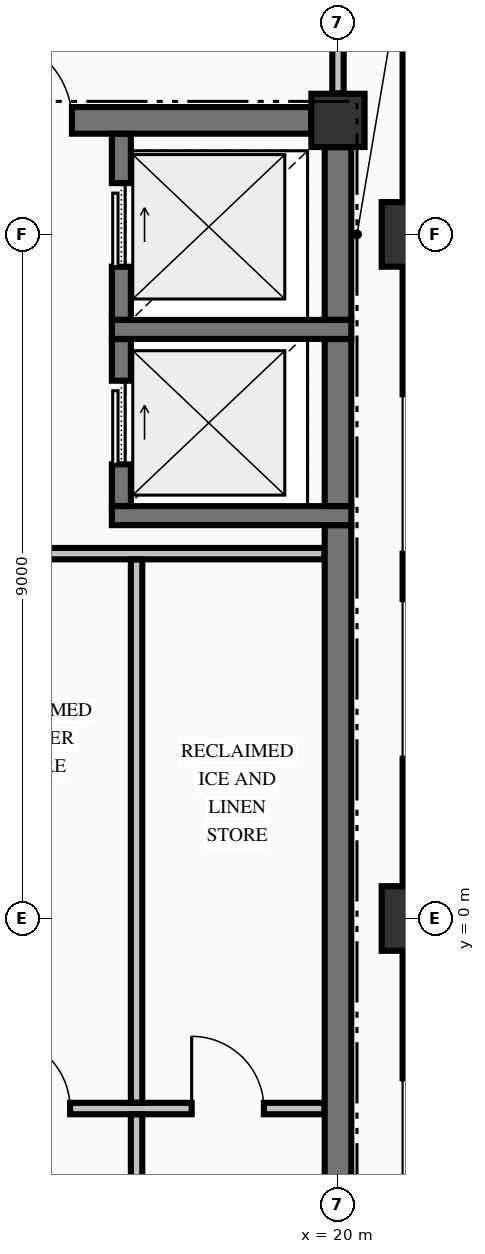
"""IFC4 building model, lengths in metres.
Left out: names, types, materials, properties, quantities, classifications, styles, units other than length and angle.
Written with IfcOpenShell. Run it as: python <this file> out.ifc"""

import sys

from ifc_helpers import new_model, si_unit, direction, frame, frame_2d, origin, origin_2d, place, context, subcontext, project, spatial, rectangle, extrude, element, fill, save


model = new_model("IFC4")
c1 = context("Model", 3, precision=1e-05, world=origin(), true_north=direction((0.0, 1.0)))
c2 = subcontext(c1, "Body", "Model", "MODEL_VIEW")
j1 = project(units=[si_unit("LENGTHUNIT", "METRE"), si_unit("PLANEANGLEUNIT", "RADIAN")], contexts=[c1])
p1 = place(None, origin())
s1 = spatial("IfcSite", under=j1, at=p1, CompositionType="ELEMENT")
p2 = place(p1, origin())
s2 = spatial("IfcBuilding", under=s1, at=p2, CompositionType="ELEMENT")
p3 = place(p2, frame((0.0, 0.0, 270.58)))
s3 = spatial("IfcBuildingStorey", under=s2, at=p3, CompositionType="ELEMENT", Elevation=270.58)
for number, where, z_axis, x_axis in (
    (1, (21.0, 0.0, -0.325), (0.0, 0.0, 1.0), (1.0, 0.0, 0.0)),
    (2, (21.0, 9.0, -0.325), (0.0, 0.0, 1.0), (1.0, 0.0, 0.0)),
):
    element("IfcColumn", number, at=place(p3, frame(where, z_axis=z_axis, x_axis=x_axis)), inside=s3, PredefinedType="COLUMN", context=c2, shape_type="SweptSolid", body=[
        extrude(rectangle(XDim=0.85, YDim=0.85, at=origin_2d()), origin(), (0.0, 0.0, 1.0), 3.815),
    ])
p4 = place(p3, frame((20.0, 10.5, -0.325), z_axis=(0.0, 0.0, 1.0), x_axis=(1.0, 0.0, 0.0)))
e3 = element("IfcColumn", 3, at=p4, inside=s3, PredefinedType="COLUMN", context=c2, shape_type="SweptSolid", body=[
    extrude(rectangle(XDim=0.7, YDim=0.7, at=origin_2d()), origin(), (0.0, 0.0, 1.0), 3.815),
])
p5 = place(p3, frame((21.0, -8.545, 0.0), z_axis=(0.0, 0.0, 1.0), x_axis=(0.0, 1.0, 0.0)))
e4 = element("IfcWall", 4, at=p5, inside=s3, PredefinedType="STANDARD", context=c2, shape_type="SweptSolid", body=[
    extrude(rectangle(XDim=8.09, YDim=0.3, at=frame_2d((4.045, 0.0))), origin(), (0.0, 0.0, 1.0), 2.882),
])
p6 = place(p5, frame((1.647, 0.0, 0.7)))
e5 = element("IfcOpeningElement", 5, at=p6, cuts=e4, PredefinedType="OPENING", context=c2, shape_type="SweptSolid", body=[
    extrude(rectangle(XDim=2.1, YDim=1.5, at=frame_2d((1.05, 0.75))), frame((0.0, 0.16, 0.0), z_axis=(0.0, -1.0, 0.0), x_axis=(1.0, 0.0, 0.0)), (0.0, 0.0, 1.0), 0.32),
])
p7 = place(p5, frame((4.343, 0.0, 0.7)))
e6 = element("IfcOpeningElement", 6, at=p7, cuts=e4, PredefinedType="OPENING", context=c2, shape_type="SweptSolid", body=[
    extrude(rectangle(XDim=2.1, YDim=1.5, at=frame_2d((1.05, 0.75))), frame((0.0, 0.16, 0.0), z_axis=(0.0, -1.0, 0.0), x_axis=(1.0, 0.0, 0.0)), (0.0, 0.0, 1.0), 0.32),
])
p8 = place(p3, frame((21.0, 0.455, 0.0), z_axis=(0.0, 0.0, 1.0), x_axis=(0.0, 1.0, 0.0)))
e7 = element("IfcWall", 7, at=p8, inside=s3, PredefinedType="STANDARD", context=c2, shape_type="SweptSolid", body=[
    extrude(rectangle(XDim=8.09, YDim=0.3, at=frame_2d((4.045, 0.0))), origin(), (0.0, 0.0, 1.0), 2.882),
])
p9 = place(p8, frame((1.647, 0.0, 0.7)))
e8 = element("IfcOpeningElement", 8, at=p9, cuts=e7, PredefinedType="OPENING", context=c2, shape_type="SweptSolid", body=[
    extrude(rectangle(XDim=2.1, YDim=1.5, at=frame_2d((1.05, 0.75))), frame((0.0, 0.16, 0.0), z_axis=(0.0, -1.0, 0.0), x_axis=(1.0, 0.0, 0.0)), (0.0, 0.0, 1.0), 0.32),
])
p10 = place(p8, frame((4.343, 0.0, 0.7)))
e9 = element("IfcOpeningElement", 9, at=p10, cuts=e7, PredefinedType="OPENING", context=c2, shape_type="SweptSolid", body=[
    extrude(rectangle(XDim=2.1, YDim=1.5, at=frame_2d((1.05, 0.75))), frame((0.0, 0.16, 0.0), z_axis=(0.0, -1.0, 0.0), x_axis=(1.0, 0.0, 0.0)), (0.0, 0.0, 1.0), 0.32),
])
p11 = place(p3, frame((21.0, 9.455, 0.0), z_axis=(0.0, 0.0, 1.0), x_axis=(0.0, 1.0, 0.0)))
e10 = element("IfcWall", 10, at=p11, inside=s3, PredefinedType="STANDARD", context=c2, shape_type="SweptSolid", body=[
    extrude(rectangle(XDim=8.09, YDim=0.3, at=frame_2d((4.045, 0.0))), origin(), (0.0, 0.0, 1.0), 2.882),
])
for number, where, z_axis, x_axis in (
    (11, (17.025, 5.3, 0.0), (0.0, 0.0, 1.0), (1.0, 0.0, 0.0)),
    (12, (17.025, 7.75, 0.0), (0.0, 0.0, 1.0), (1.0, 0.0, 0.0)),
):
    element("IfcWall", number, at=place(p3, frame(where, z_axis=z_axis, x_axis=x_axis)), inside=s3, PredefinedType="SOLIDWALL", context=c2, shape_type="SweptSolid", body=[
        extrude(rectangle(XDim=3.15, YDim=0.25, at=frame_2d((1.575, 0.0))), origin(), (0.0, 0.0, 1.0), 3.49),
    ])
p12 = place(p3, frame((14.7, 10.5, 0.0), z_axis=(0.0, 0.0, 1.0), x_axis=(1.0, 0.0, 0.0)))
e13 = element("IfcWall", 13, at=p12, inside=s3, PredefinedType="SHEAR", context=c2, shape_type="SweptSolid", body=[
    extrude(rectangle(XDim=4.946, YDim=0.35, at=frame_2d((2.473, 0.0))), origin(), (0.0, 0.0, 1.0), 3.49),
])
p13 = place(p12, frame((0.7, 0.0, 0.0)))
e14 = element("IfcOpeningElement", 14, at=p13, cuts=e13, PredefinedType="OPENING", context=c2, shape_type="SweptSolid", body=[
    extrude(rectangle(XDim=1.1, YDim=2.15, at=frame_2d((0.55, 1.075))), frame((0.0, 0.185, 0.0), z_axis=(0.0, -1.0, 0.0), x_axis=(1.0, 0.0, 0.0)), (0.0, 0.0, 1.0), 0.37),
])
p14 = place(p3, frame((14.878, -2.5, 0.0), z_axis=(0.0, 0.0, 1.0), x_axis=(1.0, 0.0, 0.0)))
e15 = element("IfcWall", 15, at=p14, inside=s3, PredefinedType="PARTITIONING", context=c2, shape_type="SweptSolid", body=[
    extrude(rectangle(XDim=4.944, YDim=0.15, at=frame_2d((2.472, 0.0))), origin(), (0.0, 0.0, 1.0), 3.49),
])
p15 = place(p14, frame((0.647, 0.0, 0.0)))
e16 = element("IfcOpeningElement", 16, at=p15, cuts=e15, PredefinedType="OPENING", context=c2, shape_type="SweptSolid", body=[
    extrude(rectangle(XDim=0.95, YDim=2.15, at=frame_2d((0.475, 1.075))), frame((0.0, 0.085, 0.0), z_axis=(0.0, -1.0, 0.0), x_axis=(1.0, 0.0, 0.0)), (0.0, 0.0, 1.0), 0.17),
])
p16 = place(p14, frame((3.197, 0.0, 0.0)))
e17 = element("IfcOpeningElement", 17, at=p16, cuts=e15, PredefinedType="OPENING", context=c2, shape_type="SweptSolid", body=[
    extrude(rectangle(XDim=0.95, YDim=2.15, at=frame_2d((0.475, 1.075))), frame((0.0, 0.085, 0.0), z_axis=(0.0, -1.0, 0.0), x_axis=(1.0, 0.0, 0.0)), (0.0, 0.0, 1.0), 0.17),
])
p17 = place(p3, frame((14.878, 4.8, 0.0), z_axis=(0.0, 0.0, 1.0), x_axis=(1.0, 0.0, 0.0)))
e18 = element("IfcWall", 18, at=p17, inside=s3, PredefinedType="PARTITIONING", context=c2, shape_type="SweptSolid", body=[
    extrude(rectangle(XDim=4.944, YDim=0.15, at=frame_2d((2.472, 0.0))), origin(), (0.0, 0.0, 1.0), 3.49),
])
p18 = place(p3, frame((17.15, 5.427, 0.0), z_axis=(0.0, 0.0, 1.0), x_axis=(0.0, 1.0, 0.0)))
e19 = element("IfcWall", 19, at=p18, inside=s3, PredefinedType="SOLIDWALL", context=c2, shape_type="SweptSolid", body=[
    extrude(rectangle(XDim=2.196, YDim=0.25, at=frame_2d((1.098, 0.0))), origin(), (0.0, 0.0, 1.0), 3.49),
])
p19 = place(p18, frame((0.548, 0.0, 0.0)))
e20 = element("IfcOpeningElement", 20, at=p19, cuts=e19, PredefinedType="OPENING", context=c2, shape_type="SweptSolid", body=[
    extrude(rectangle(XDim=1.1, YDim=2.2, at=frame_2d((0.55, 1.1))), frame((0.0, 0.135, 0.0), z_axis=(0.0, -1.0, 0.0), x_axis=(1.0, 0.0, 0.0)), (0.0, 0.0, 1.0), 0.27),
])
p20 = place(p3, frame((17.15, 7.877, 0.0), z_axis=(0.0, 0.0, 1.0), x_axis=(0.0, 1.0, 0.0)))
e21 = element("IfcWall", 21, at=p20, inside=s3, PredefinedType="SOLIDWALL", context=c2, shape_type="SweptSolid", body=[
    extrude(rectangle(XDim=2.446, YDim=0.25, at=frame_2d((1.223, 0.0))), origin(), (0.0, 0.0, 1.0), 3.49),
])
p21 = place(p20, frame((0.698, 0.0, 0.0)))
e22 = element("IfcOpeningElement", 22, at=p21, cuts=e21, PredefinedType="OPENING", context=c2, shape_type="SweptSolid", body=[
    extrude(rectangle(XDim=1.1, YDim=2.2, at=frame_2d((0.55, 1.1))), frame((0.0, 0.135, 0.0), z_axis=(0.0, -1.0, 0.0), x_axis=(1.0, 0.0, 0.0)), (0.0, 0.0, 1.0), 0.27),
])
p22 = place(p3, frame((20.0, -9.596, 0.0), z_axis=(0.0, 0.0, 1.0), x_axis=(0.0, 1.0, 0.0)))
e23 = element("IfcWall", 23, at=p22, inside=s3, PredefinedType="SHEAR", context=c2, shape_type="SweptSolid", body=[
    extrude(rectangle(XDim=14.769, YDim=0.35, at=frame_2d((7.385, 0.0))), origin(), (0.0, 0.0, 1.0), 3.49),
])
p23 = place(p3, frame((20.0, 5.427, 0.0), z_axis=(0.0, 0.0, 1.0), x_axis=(0.0, 1.0, 0.0)))
e24 = element("IfcWall", 24, at=p23, inside=s3, PredefinedType="SHEAR", context=c2, shape_type="SweptSolid", body=[
    extrude(rectangle(XDim=2.196, YDim=0.35, at=frame_2d((1.098, 0.0))), origin(), (0.0, 0.0, 1.0), 3.49),
])
p24 = place(p3, frame((20.0, 7.877, 0.0), z_axis=(0.0, 0.0, 1.0), x_axis=(0.0, 1.0, 0.0)))
e25 = element("IfcWall", 25, at=p24, inside=s3, PredefinedType="SHEAR", context=c2, shape_type="SweptSolid", body=[
    extrude(rectangle(XDim=2.269, YDim=0.35, at=frame_2d((1.135, 0.0))), origin(), (0.0, 0.0, 1.0), 3.49),
])
p25 = place(p3, frame((17.35, -9.772, 0.0), z_axis=(0.0, 0.0, 1.0), x_axis=(0.0, 1.0, 0.0)))
e26 = element("IfcWall", 26, at=p25, inside=s3, PredefinedType="PARTITIONING", context=c2, shape_type="SweptSolid", body=[
    extrude(rectangle(XDim=7.194, YDim=0.15, at=frame_2d((3.597, 0.0))), origin(), (0.0, 0.0, 1.0), 3.49),
])
p26 = place(p3, frame((17.35, -2.422, 0.0), z_axis=(0.0, 0.0, 1.0), x_axis=(0.0, 1.0, 0.0)))
e27 = element("IfcWall", 27, at=p26, inside=s3, PredefinedType="PARTITIONING", context=c2, shape_type="SweptSolid", body=[
    extrude(rectangle(XDim=7.144, YDim=0.15, at=frame_2d((3.572, 0.0))), origin(), (0.0, 0.0, 1.0), 3.49),
])
p27 = place(p3, frame((20.0, 10.856, 0.0), z_axis=(0.0, 0.0, 1.0), x_axis=(0.0, 1.0, 0.0)))
e28 = element("IfcWall", 28, at=p27, inside=s3, PredefinedType="PARTITIONING", context=c2, shape_type="SweptSolid", body=[
    extrude(rectangle(XDim=2.216, YDim=0.15, at=frame_2d((1.108, 0.0))), origin(), (0.0, 0.0, 1.0), 3.08),
])
p28 = place(p19, origin())
e29 = element("IfcDoor", 29, at=p28, inside=s3, OperationType="SLIDING_TO_RIGHT", PredefinedType="DOOR", context=c2, shape_type="SweptSolid", body=[
    extrude(rectangle(XDim=1.1, YDim=2.2, at=frame_2d((0.55, 1.1))), frame((0.0, 0.025, 0.0), z_axis=(0.0, -1.0, 0.0), x_axis=(1.0, 0.0, 0.0)), (0.0, 0.0, 1.0), 0.05),
])
fill(e20, e29)
p29 = place(p21, origin())
e30 = element("IfcDoor", 30, at=p29, inside=s3, OperationType="SLIDING_TO_RIGHT", PredefinedType="DOOR", context=c2, shape_type="SweptSolid", body=[
    extrude(rectangle(XDim=1.1, YDim=2.2, at=frame_2d((0.55, 1.1))), frame((0.0, 0.025, 0.0), z_axis=(0.0, -1.0, 0.0), x_axis=(1.0, 0.0, 0.0)), (0.0, 0.0, 1.0), 0.05),
])
fill(e22, e30)
p30 = place(p13, origin())
e31 = element("IfcDoor", 31, at=p30, inside=s3, OperationType="SINGLE_SWING_LEFT", PredefinedType="DOOR", context=c2, shape_type="SweptSolid", body=[
    extrude(rectangle(XDim=1.1, YDim=2.15, at=frame_2d((0.55, 1.075))), frame((0.0, 0.025, 0.0), z_axis=(0.0, -1.0, 0.0), x_axis=(1.0, 0.0, 0.0)), (0.0, 0.0, 1.0), 0.05),
])
fill(e14, e31)
p31 = place(p15, origin())
e32 = element("IfcDoor", 32, at=p31, inside=s3, OperationType="SINGLE_SWING_LEFT", PredefinedType="DOOR", context=c2, shape_type="SweptSolid", body=[
    extrude(rectangle(XDim=0.95, YDim=2.15, at=frame_2d((0.475, 1.075))), frame((0.0, 0.025, 0.0), z_axis=(0.0, -1.0, 0.0), x_axis=(1.0, 0.0, 0.0)), (0.0, 0.0, 1.0), 0.05),
])
fill(e16, e32)
p32 = place(p16, origin())
e33 = element("IfcDoor", 33, at=p32, inside=s3, OperationType="SINGLE_SWING_LEFT", PredefinedType="DOOR", context=c2, shape_type="SweptSolid", body=[
    extrude(rectangle(XDim=0.95, YDim=2.15, at=frame_2d((0.475, 1.075))), frame((0.0, 0.025, 0.0), z_axis=(0.0, -1.0, 0.0), x_axis=(1.0, 0.0, 0.0)), (0.0, 0.0, 1.0), 0.05),
])
fill(e17, e33)
save(model, sys.argv[1])
